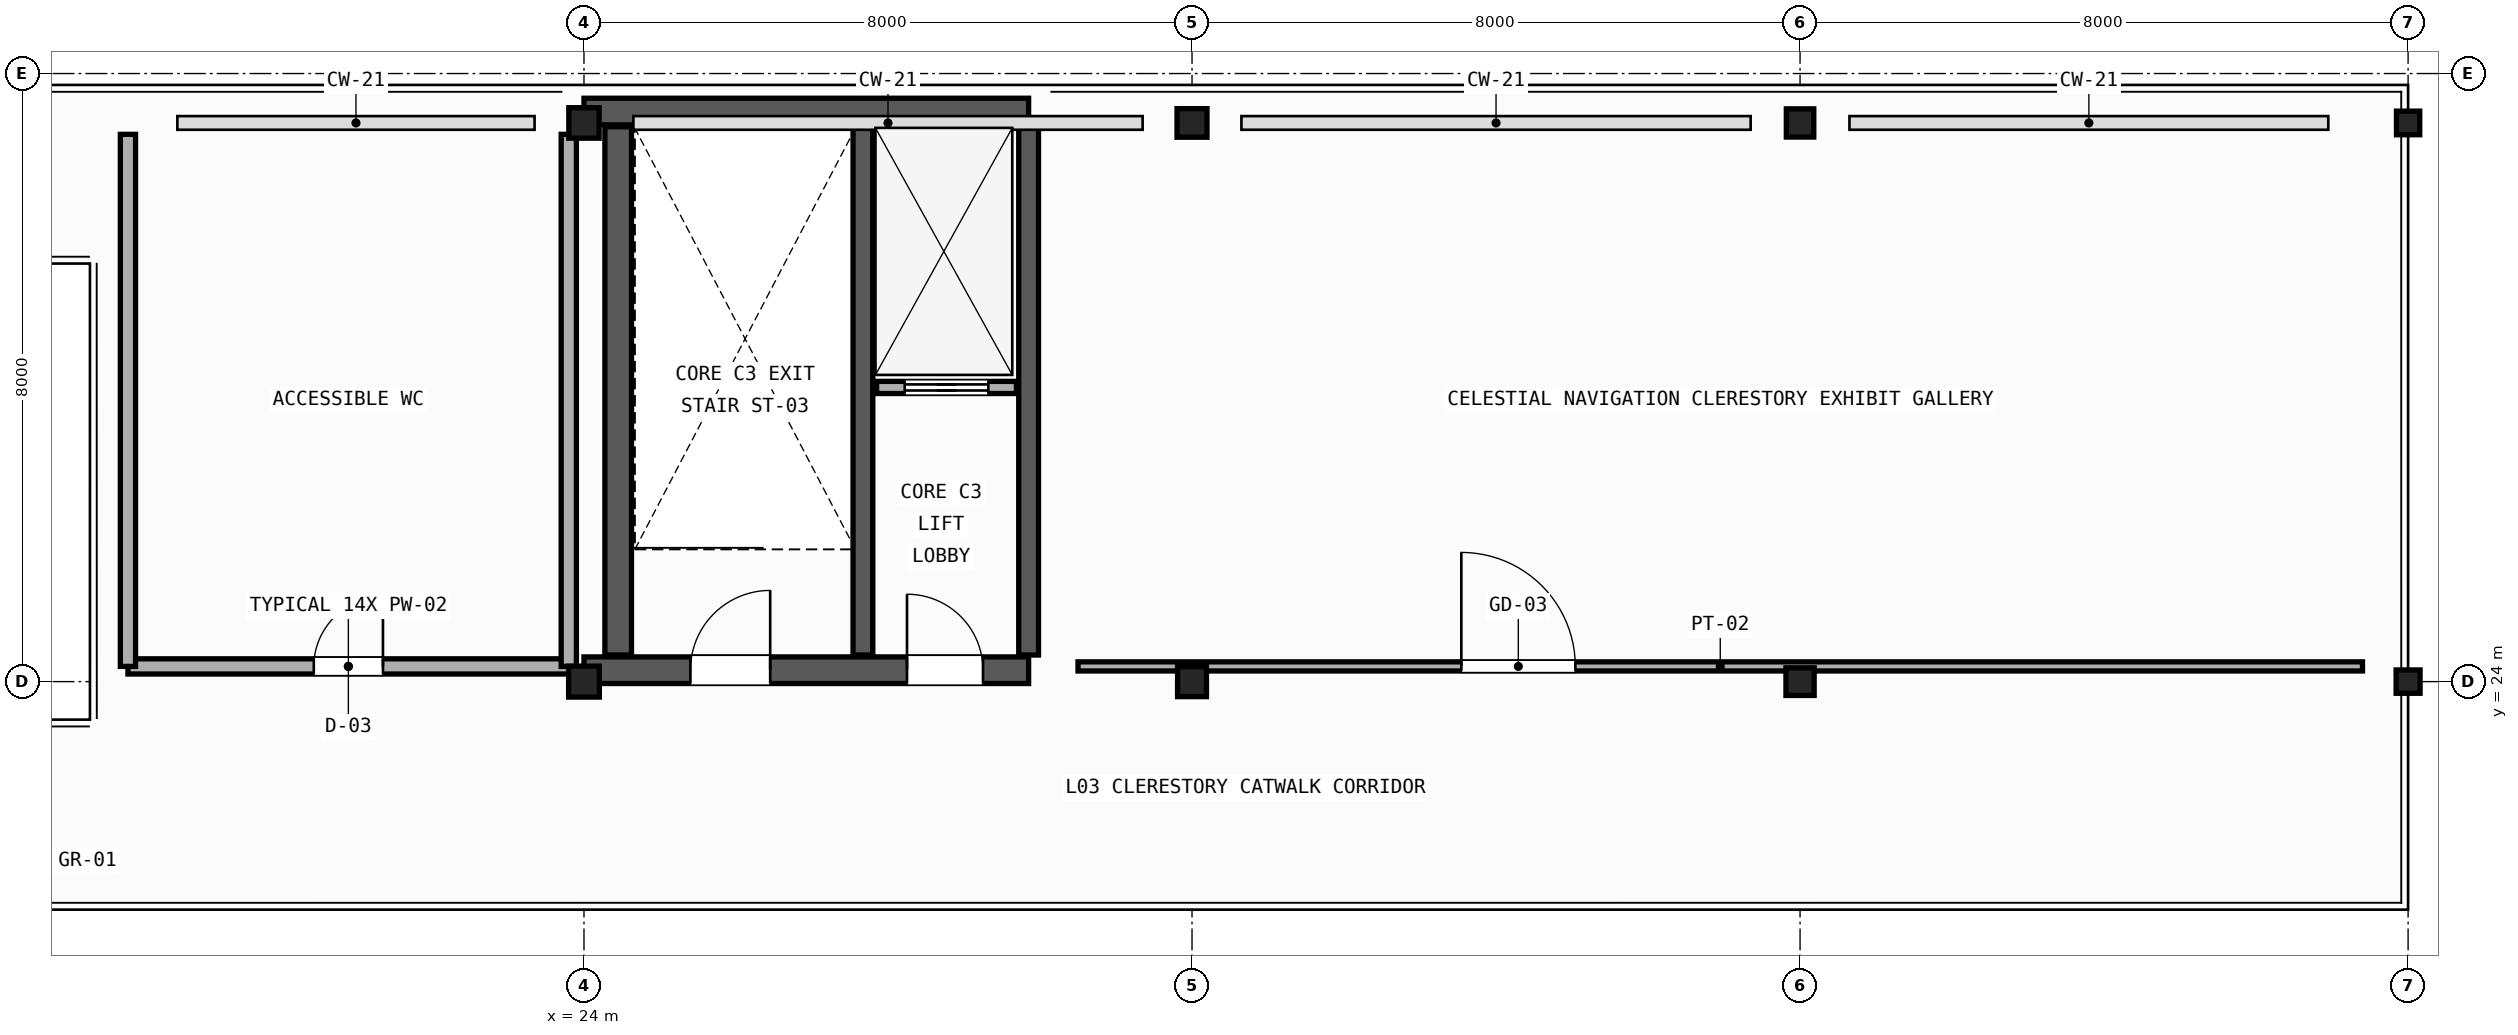
"""IFC4 building model, lengths in metres.
Left out: names, types, materials, properties, quantities, classifications, styles, units other than length and angle.
Written with IfcOpenShell. Run it as: python <this file> out.ifc"""

import sys

from ifc_helpers import new_model, si_unit, direction, frame, frame_2d, origin, origin_2d, place, context, subcontext, project, spatial, rectangle, i_section, extrude, element, fill, save


model = new_model("IFC4")
c1 = context("Model", 3, precision=1e-05, world=origin(), true_north=direction((0.0, 1.0)))
c2 = subcontext(c1, "Body", "Model", "MODEL_VIEW")
j1 = project(units=[si_unit("LENGTHUNIT", "METRE"), si_unit("PLANEANGLEUNIT", "RADIAN")], contexts=[c1])
p1 = place(None, origin())
s1 = spatial("IfcSite", under=j1, at=p1, CompositionType="ELEMENT")
p2 = place(p1, origin())
s2 = spatial("IfcBuilding", under=s1, at=p2, CompositionType="ELEMENT")
p3 = place(p2, frame((0.0, 0.0, 15.0)))
s3 = spatial("IfcBuildingStorey", under=s2, at=p3, CompositionType="ELEMENT", Elevation=15.0)
p4 = place(p3, frame((24.0, 24.0, 0.0), z_axis=(0.0, 0.0, 1.0), x_axis=(1.0, 0.0, 0.0)))
e1 = element("IfcColumn", 1, at=p4, inside=s3, PredefinedType="COLUMN", context=c2, shape_type="SweptSolid", body=[
    extrude(i_section(OverallWidth=0.404, OverallDepth=0.407, WebThickness=0.027, FlangeThickness=0.044, FilletRadius=0.015, at=origin_2d()), origin(), (0.0, 0.0, 1.0), 7.575),
])
p5 = place(p3, frame((24.0, 31.35, 0.0), z_axis=(0.0, 0.0, 1.0), x_axis=(0.0, 1.0, 0.0)))
e2 = element("IfcColumn", 2, at=p5, inside=s3, PredefinedType="COLUMN", context=c2, shape_type="SweptSolid", body=[
    extrude(i_section(OverallWidth=0.401, OverallDepth=0.399, WebThickness=0.025, FlangeThickness=0.04, FilletRadius=0.015, at=origin_2d()), origin(), (0.0, 0.0, 1.0), 5.893),
])
p6 = place(p3, frame((32.0, 24.0, 0.0), z_axis=(0.0, 0.0, 1.0), x_axis=(0.0, 1.0, 0.0)))
e3 = element("IfcColumn", 3, at=p6, inside=s3, PredefinedType="COLUMN", context=c2, shape_type="SweptSolid", body=[
    extrude(i_section(OverallWidth=0.395, OverallDepth=0.38, WebThickness=0.019, FlangeThickness=0.03, FilletRadius=0.015, at=origin_2d()), origin(), (0.0, 0.0, 1.0), 7.234),
])
p7 = place(p3, frame((32.0, 31.35, 0.0), z_axis=(0.0, 0.0, 1.0), x_axis=(1.0, 0.0, 0.0)))
e4 = element("IfcColumn", 4, at=p7, inside=s3, PredefinedType="COLUMN", context=c2, shape_type="SweptSolid", body=[
    extrude(i_section(OverallWidth=0.394, OverallDepth=0.376, WebThickness=0.017, FlangeThickness=0.028, FilletRadius=0.015, at=origin_2d()), origin(), (0.0, 0.0, 1.0), 5.551),
])
p8 = place(p3, frame((40.0, 24.0, 0.0), z_axis=(0.0, 0.0, 1.0), x_axis=(1.0, 0.0, 0.0)))
e5 = element("IfcColumn", 5, at=p8, inside=s3, PredefinedType="COLUMN", context=c2, shape_type="SweptSolid", body=[
    extrude(i_section(OverallWidth=0.371, OverallDepth=0.364, WebThickness=0.013, FlangeThickness=0.022, FilletRadius=0.015, at=origin_2d()), origin(), (0.0, 0.0, 1.0), 6.892),
])
p9 = place(p3, frame((40.0, 31.35, 0.0), z_axis=(0.0, 0.0, 1.0), x_axis=(0.0, 1.0, 0.0)))
e6 = element("IfcColumn", 6, at=p9, inside=s3, PredefinedType="COLUMN", context=c2, shape_type="SweptSolid", body=[
    extrude(i_section(OverallWidth=0.371, OverallDepth=0.361, WebThickness=0.012, FlangeThickness=0.02, FilletRadius=0.015, at=origin_2d()), origin(), (0.0, 0.0, 1.0), 5.209),
])
p10 = place(p3, frame((48.0, 24.0, 0.0), z_axis=(0.0, 0.0, 1.0), x_axis=(0.0, 1.0, 0.0)))
e7 = element("IfcColumn", 7, at=p10, inside=s3, PredefinedType="COLUMN", context=c2, shape_type="SweptSolid", body=[
    extrude(i_section(OverallWidth=0.307, OverallDepth=0.315, WebThickness=0.012, FlangeThickness=0.019, FilletRadius=0.013, at=origin_2d()), origin(), (0.0, 0.0, 1.0), 6.55),
])
p11 = place(p3, frame((48.0, 31.35, 0.0), z_axis=(0.0, 0.0, 1.0), x_axis=(1.0, 0.0, 0.0)))
e8 = element("IfcColumn", 8, at=p11, inside=s3, PredefinedType="COLUMN", context=c2, shape_type="SweptSolid", body=[
    extrude(i_section(OverallWidth=0.306, OverallDepth=0.311, WebThickness=0.011, FlangeThickness=0.017, FilletRadius=0.013, at=origin_2d()), origin(), (0.0, 0.0, 1.0), 4.868),
])
p12 = place(p3, frame((24.0, 24.15, 0.0), z_axis=(0.0, 0.0, 1.0), x_axis=(1.0, 0.0, 0.0)))
e9 = element("IfcWall", 9, at=p12, inside=s3, PredefinedType="SHEAR", context=c2, shape_type="SweptSolid", body=[
    extrude(rectangle(XDim=5.85, YDim=0.35, at=frame_2d((2.925, 0.0))), origin(), (0.0, 0.0, 1.0), 4.3),
])
p13 = place(p12, frame((1.4, 0.0, 0.0)))
e10 = element("IfcOpeningElement", 10, at=p13, cuts=e9, PredefinedType="OPENING", context=c2, shape_type="SweptSolid", body=[
    extrude(rectangle(XDim=1.05, YDim=2.1, at=frame_2d((0.525, 1.05))), frame((0.0, 0.185, 0.0), z_axis=(0.0, -1.0, 0.0), x_axis=(1.0, 0.0, 0.0)), (0.0, 0.0, 1.0), 0.37),
])
p14 = place(p12, frame((4.25, 0.0, 0.0)))
e11 = element("IfcOpeningElement", 11, at=p14, cuts=e9, PredefinedType="OPENING", context=c2, shape_type="SweptSolid", body=[
    extrude(rectangle(XDim=1.0, YDim=2.15, at=frame_2d((0.5, 1.075))), frame((0.0, 0.185, 0.0), z_axis=(0.0, -1.0, 0.0), x_axis=(1.0, 0.0, 0.0)), (0.0, 0.0, 1.0), 0.37),
])
p15 = place(p3, frame((24.0, 31.5, 0.0), z_axis=(0.0, 0.0, 1.0), x_axis=(1.0, 0.0, 0.0)))
e12 = element("IfcWall", 12, at=p15, inside=s3, PredefinedType="SHEAR", context=c2, shape_type="SweptSolid", body=[
    extrude(rectangle(XDim=5.85, YDim=0.35, at=frame_2d((2.925, 0.0))), origin(), (0.0, 0.0, 1.0), 4.3),
])
p16 = place(p3, frame((24.45, 24.35, 0.0), z_axis=(0.0, 0.0, 1.0), x_axis=(0.0, 1.0, 0.0)))
e13 = element("IfcWall", 13, at=p16, inside=s3, PredefinedType="SHEAR", context=c2, shape_type="SweptSolid", body=[
    extrude(rectangle(XDim=6.95, YDim=0.35, at=frame_2d((3.475, 0.0))), origin(), (0.0, 0.0, 1.0), 4.3),
])
for number, where, z_axis, x_axis in (
    (14, (29.85, 24.35, 0.0), (0.0, 0.0, 1.0), (0.0, 1.0, 0.0)),
    (15, (27.67, 24.35, 0.0), (0.0, 0.0, 1.0), (0.0, 1.0, 0.0)),
):
    element("IfcWall", number, at=place(p3, frame(where, z_axis=z_axis, x_axis=x_axis)), inside=s3, PredefinedType="SHEAR", context=c2, shape_type="SweptSolid", body=[
        extrude(rectangle(XDim=6.95, YDim=0.26, at=frame_2d((3.475, 0.0))), origin(), (0.0, 0.0, 1.0), 4.3),
    ])
p17 = place(p3, frame((27.85, 27.87, 0.0), z_axis=(0.0, 0.0, 1.0), x_axis=(1.0, 0.0, 0.0)))
e16 = element("IfcWall", 16, at=p17, inside=s3, PredefinedType="PARTITIONING", context=c2, shape_type="SweptSolid", body=[
    extrude(rectangle(XDim=1.84, YDim=0.16, at=frame_2d((0.92, 0.0))), origin(), (0.0, 0.0, 1.0), 3.6),
])
p18 = place(p17, frame((0.37, 0.0, 0.0)))
e17 = element("IfcOpeningElement", 17, at=p18, cuts=e16, PredefinedType="OPENING", context=c2, shape_type="SweptSolid", body=[
    extrude(rectangle(XDim=1.1, YDim=2.15, at=frame_2d((0.55, 1.075))), frame((0.0, 0.09, 0.0), z_axis=(0.0, -1.0, 0.0), x_axis=(1.0, 0.0, 0.0)), (0.0, 0.0, 1.0), 0.18),
])
p19 = place(p3, frame((30.5, 24.2, 0.0), z_axis=(0.0, 0.0, 1.0), x_axis=(1.0, 0.0, 0.0)))
e18 = element("IfcWall", 18, at=p19, inside=s3, PredefinedType="PARTITIONING", context=c2, shape_type="SweptSolid", body=[
    extrude(rectangle(XDim=16.9, YDim=0.12, at=frame_2d((8.45, 0.0))), origin(), (0.0, 0.0, 1.0), 4.07),
])
p20 = place(p19, frame((5.043, 0.0, 0.0)))
e19 = element("IfcOpeningElement", 19, at=p20, cuts=e18, PredefinedType="OPENING", context=c2, shape_type="SweptSolid", body=[
    extrude(rectangle(XDim=1.5, YDim=2.3, at=frame_2d((0.75, 1.15))), frame((0.0, 0.07, 0.0), z_axis=(0.0, -1.0, 0.0), x_axis=(1.0, 0.0, 0.0)), (0.0, 0.0, 1.0), 0.14),
])
p21 = place(p3, frame((18.0, 24.2, 0.0), z_axis=(0.0, 0.0, 1.0), x_axis=(1.0, 0.0, 0.0)))
e20 = element("IfcWall", 20, at=p21, inside=s3, PredefinedType="PLUMBINGWALL", context=c2, shape_type="SweptSolid", body=[
    extrude(rectangle(XDim=5.8, YDim=0.2, at=frame_2d((2.9, 0.0))), origin(), (0.0, 0.0, 1.0), 4.29),
])
p22 = place(p21, frame((2.445, 0.0, 0.0)))
e21 = element("IfcOpeningElement", 21, at=p22, cuts=e20, PredefinedType="OPENING", context=c2, shape_type="SweptSolid", body=[
    extrude(rectangle(XDim=0.91, YDim=2.1, at=frame_2d((0.455, 1.05))), frame((0.0, 0.11, 0.0), z_axis=(0.0, -1.0, 0.0), x_axis=(1.0, 0.0, 0.0)), (0.0, 0.0, 1.0), 0.22),
])
for number, where, z_axis, x_axis in (
    (22, (18.0, 24.2, 0.0), (0.0, 0.0, 1.0), (0.0, 1.0, 0.0)),
    (23, (23.8, 24.2, 0.0), (0.0, 0.0, 1.0), (0.0, 1.0, 0.0)),
):
    element("IfcWall", number, at=place(p3, frame(where, z_axis=z_axis, x_axis=x_axis)), inside=s3, PredefinedType="PLUMBINGWALL", context=c2, shape_type="SweptSolid", body=[
        extrude(rectangle(XDim=7.0, YDim=0.2, at=frame_2d((3.5, 0.0))), origin(), (0.0, 0.0, 1.0), 4.29),
    ])
p23 = place(p18, origin())
e24 = element("IfcDoor", 24, at=p23, inside=s3, OperationType="SLIDING_TO_LEFT", PredefinedType="DOOR", context=c2, shape_type="SweptSolid", body=[
    extrude(rectangle(XDim=1.1, YDim=2.15, at=frame_2d((0.55, 1.075))), frame((0.0, 0.025, 0.0), z_axis=(0.0, -1.0, 0.0), x_axis=(1.0, 0.0, 0.0)), (0.0, 0.0, 1.0), 0.05),
])
fill(e17, e24)
p24 = place(p13, origin())
e25 = element("IfcDoor", 25, at=p24, inside=s3, OperationType="SINGLE_SWING_RIGHT", PredefinedType="DOOR", context=c2, shape_type="SweptSolid", body=[
    extrude(rectangle(XDim=1.05, YDim=2.1, at=frame_2d((0.525, 1.05))), frame((0.0, 0.025, 0.0), z_axis=(0.0, -1.0, 0.0), x_axis=(1.0, 0.0, 0.0)), (0.0, 0.0, 1.0), 0.05),
])
fill(e10, e25)
p25 = place(p14, origin())
e26 = element("IfcDoor", 26, at=p25, inside=s3, OperationType="SINGLE_SWING_LEFT", PredefinedType="DOOR", context=c2, shape_type="SweptSolid", body=[
    extrude(rectangle(XDim=1.0, YDim=2.15, at=frame_2d((0.5, 1.075))), frame((0.0, 0.025, 0.0), z_axis=(0.0, -1.0, 0.0), x_axis=(1.0, 0.0, 0.0)), (0.0, 0.0, 1.0), 0.05),
])
fill(e11, e26)
p26 = place(p20, origin())
e27 = element("IfcDoor", 27, at=p26, inside=s3, OperationType="SINGLE_SWING_LEFT", PredefinedType="DOOR", context=c2, shape_type="SweptSolid", body=[
    extrude(rectangle(XDim=1.5, YDim=2.3, at=frame_2d((0.75, 1.15))), frame((0.0, 0.025, 0.0), z_axis=(0.0, -1.0, 0.0), x_axis=(1.0, 0.0, 0.0)), (0.0, 0.0, 1.0), 0.05),
])
fill(e19, e27)
p27 = place(p22, origin())
e28 = element("IfcDoor", 28, at=p27, inside=s3, OperationType="SINGLE_SWING_RIGHT", PredefinedType="DOOR", context=c2, shape_type="SweptSolid", body=[
    extrude(rectangle(XDim=0.91, YDim=2.1, at=frame_2d((0.455, 1.05))), frame((0.0, 0.025, 0.0), z_axis=(0.0, -1.0, 0.0), x_axis=(1.0, 0.0, 0.0)), (0.0, 0.0, 1.0), 0.05),
])
fill(e21, e28)
save(model, sys.argv[1])
